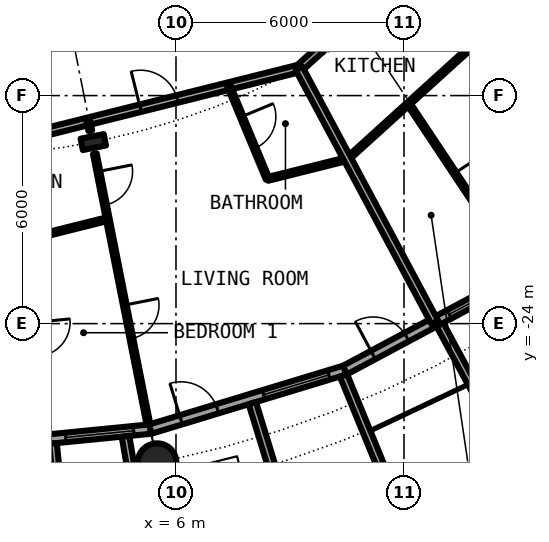
"""IFC4 building model, lengths in metres.
Left out: names, types, materials, properties, quantities, classifications, styles, units other than length and angle.
Written with IfcOpenShell. Run it as: python <this file> out.ifc"""

import sys

from ifc_helpers import new_model, si_unit, direction, frame, frame_2d, origin, origin_2d, place, context, subcontext, project, spatial, rectangle, hollow_circle, i_section, extrude, element, fill, save


model = new_model("IFC4")
c1 = context("Model", 3, precision=1e-05, world=origin(), true_north=direction((0.0, 1.0)))
c2 = subcontext(c1, "Body", "Model", "MODEL_VIEW")
j1 = project(units=[si_unit("LENGTHUNIT", "METRE"), si_unit("PLANEANGLEUNIT", "RADIAN")], contexts=[c1])
p1 = place(None, origin())
s1 = spatial("IfcSite", under=j1, at=p1, CompositionType="ELEMENT")
p2 = place(p1, origin())
s2 = spatial("IfcBuilding", under=s1, at=p2, CompositionType="ELEMENT")
p3 = place(p2, frame((0.0, 0.0, 31.95)))
s3 = spatial("IfcBuildingStorey", under=s2, at=p3, CompositionType="ELEMENT", Elevation=31.95)
p4 = place(p3, frame((5.501, -27.658, 0.0), z_axis=(0.0, 0.0, 1.0), x_axis=(1.0, 0.0, 0.0)))
e1 = element("IfcColumn", 1, at=p4, inside=s3, PredefinedType="COLUMN", context=c2, shape_type="SweptSolid", body=[
    extrude(hollow_circle(Radius=0.508, WallThickness=0.05, at=origin_2d()), origin(), (0.0, 0.0, 1.0), 3.05),
])
p5 = place(p3, frame((3.824, -19.223, 0.0), z_axis=(0.0, 0.0, 1.0), x_axis=(0.195090322016, -0.980785280403, 0.0)))
e2 = element("IfcColumn", 2, at=p5, inside=s3, PredefinedType="COLUMN", context=c2, shape_type="SweptSolid", body=[
    extrude(i_section(OverallWidth=0.305, OverallDepth=0.62, WebThickness=0.021, FlangeThickness=0.04, FilletRadius=0.027, at=origin_2d()), origin(), (0.0, 0.0, 1.0), 3.05),
])
p6 = place(p3, frame((0.0, -27.3, 0.0), z_axis=(0.0, 0.0, 1.0), x_axis=(0.995173996315, 0.098126026407, 0.0)))
e3 = element("IfcWall", 3, at=p6, inside=s3, PredefinedType="SOLIDWALL", context=c2, shape_type="SweptSolid", body=[
    extrude(rectangle(XDim=5.352, YDim=0.25, at=frame_2d((2.676, 0.0))), origin(), (0.0, 0.0, 1.0), 2.7),
])
p7 = place(p6, frame((0.841, 0.0, 0.0)))
e4 = element("IfcOpeningElement", 4, at=p7, cuts=e3, PredefinedType="OPENING", context=c2, shape_type="SweptSolid", body=[
    extrude(rectangle(XDim=1.0, YDim=2.2, at=frame_2d((0.5, 1.1))), frame((0.0, 0.135, 0.0), z_axis=(0.0, -1.0, 0.0), x_axis=(1.0, 0.0, 0.0)), (0.0, 0.0, 1.0), 0.27),
])
p8 = place(p6, frame((3.111, 0.0, 0.3)))
e5 = element("IfcOpeningElement", 5, at=p8, cuts=e3, PredefinedType="OPENING", context=c2, shape_type="SweptSolid", body=[
    extrude(rectangle(XDim=1.8, YDim=2.1, at=frame_2d((0.9, 1.05))), frame((0.0, 0.135, 0.0), z_axis=(0.0, -1.0, 0.0), x_axis=(1.0, 0.0, 0.0)), (0.0, 0.0, 1.0), 0.27),
])
p9 = place(p3, frame((2.764, -27.153, -0.03), z_axis=(0.0, 0.0, 1.0), x_axis=(0.101505487237, -0.994834979311, 0.0)))
e6 = element("IfcWall", 6, at=p9, inside=s3, PredefinedType="SOLIDWALL", context=c2, shape_type="SweptSolid", body=[
    extrude(rectangle(XDim=3.007, YDim=0.2, at=frame_2d((1.503, 0.0))), origin(), (0.0, 0.0, 1.0), 2.73),
])
p10 = place(p3, frame((4.671, -26.966, -0.03), z_axis=(0.0, 0.0, 1.0), x_axis=(0.170539878907, -0.985350774954, 0.0)))
e7 = element("IfcWall", 7, at=p10, inside=s3, PredefinedType="SOLIDWALL", context=c2, shape_type="SweptSolid", body=[
    extrude(rectangle(XDim=2.932, YDim=0.2, at=frame_2d((1.466, 0.0))), origin(), (0.0, 0.0, 1.0), 2.73),
])
p11 = place(p3, frame((5.326, -26.775, 0.0), z_axis=(0.0, 0.0, 1.0), x_axis=(0.956965678721, 0.290201119486, 0.0)))
e8 = element("IfcWall", 8, at=p11, inside=s3, PredefinedType="SOLIDWALL", context=c2, shape_type="SweptSolid", body=[
    extrude(rectangle(XDim=5.351, YDim=0.25, at=frame_2d((2.676, 0.0))), origin(), (0.0, 0.0, 1.0), 2.7),
])
p12 = place(p11, frame((0.841, 0.0, 0.0)))
e9 = element("IfcOpeningElement", 9, at=p12, cuts=e8, PredefinedType="OPENING", context=c2, shape_type="SweptSolid", body=[
    extrude(rectangle(XDim=1.0, YDim=2.2, at=frame_2d((0.5, 1.1))), frame((0.0, 0.135, 0.0), z_axis=(0.0, -1.0, 0.0), x_axis=(1.0, 0.0, 0.0)), (0.0, 0.0, 1.0), 0.27),
])
p13 = place(p11, frame((3.111, 0.0, 0.3)))
e10 = element("IfcOpeningElement", 10, at=p13, cuts=e8, PredefinedType="OPENING", context=c2, shape_type="SweptSolid", body=[
    extrude(rectangle(XDim=1.8, YDim=2.1, at=frame_2d((0.9, 1.05))), frame((0.0, 0.135, 0.0), z_axis=(0.0, -1.0, 0.0), x_axis=(1.0, 0.0, 0.0)), (0.0, 0.0, 1.0), 0.27),
])
p14 = place(p3, frame((8.009, -26.092, -0.03), z_axis=(0.0, 0.0, 1.0), x_axis=(0.293406695073, -0.955987715029, 0.0)))
e11 = element("IfcWall", 11, at=p14, inside=s3, PredefinedType="SOLIDWALL", context=c2, shape_type="SweptSolid", body=[
    extrude(rectangle(XDim=3.006, YDim=0.2, at=frame_2d((1.503, 0.0))), origin(), (0.0, 0.0, 1.0), 2.73),
])
p15 = place(p3, frame((10.409, -25.364, -0.03), z_axis=(0.0, 0.0, 1.0), x_axis=(0.379509886562, -0.925187681501, 0.0)))
e12 = element("IfcWall", 12, at=p15, inside=s3, PredefinedType="SOLIDWALL", context=c2, shape_type="SweptSolid", body=[
    extrude(rectangle(XDim=2.883, YDim=0.2, at=frame_2d((1.441, 0.0))), origin(), (0.0, 0.0, 1.0), 2.73),
])
p16 = place(p3, frame((10.447, -25.222, 0.0), z_axis=(0.0, 0.0, 1.0), x_axis=(0.881915646801, 0.471407246368, 0.0)))
e13 = element("IfcWall", 13, at=p16, inside=s3, PredefinedType="SOLIDWALL", context=c2, shape_type="SweptSolid", body=[
    extrude(rectangle(XDim=5.352, YDim=0.25, at=frame_2d((2.676, 0.0))), origin(), (0.0, 0.0, 1.0), 2.7),
])
p17 = place(p16, frame((0.841, 0.0, 0.0)))
e14 = element("IfcOpeningElement", 14, at=p17, cuts=e13, PredefinedType="OPENING", context=c2, shape_type="SweptSolid", body=[
    extrude(rectangle(XDim=1.0, YDim=2.2, at=frame_2d((0.5, 1.1))), frame((0.0, 0.135, 0.0), z_axis=(0.0, -1.0, 0.0), x_axis=(1.0, 0.0, 0.0)), (0.0, 0.0, 1.0), 0.27),
])
p18 = place(p16, frame((3.111, 0.0, 0.3)))
e15 = element("IfcOpeningElement", 15, at=p18, cuts=e13, PredefinedType="OPENING", context=c2, shape_type="SweptSolid", body=[
    extrude(rectangle(XDim=1.8, YDim=2.1, at=frame_2d((0.9, 1.05))), frame((0.0, 0.135, 0.0), z_axis=(0.0, -1.0, 0.0), x_axis=(1.0, 0.0, 0.0)), (0.0, 0.0, 1.0), 0.27),
])
p19 = place(p3, frame((12.945, -24.029, -0.03), z_axis=(0.0, 0.0, 1.0), x_axis=(0.474424310775, -0.88029629861, 0.0)))
e16 = element("IfcWall", 16, at=p19, inside=s3, PredefinedType="SOLIDWALL", context=c2, shape_type="SweptSolid", body=[
    extrude(rectangle(XDim=3.006, YDim=0.2, at=frame_2d((1.503, 0.0))), origin(), (0.0, 0.0, 1.0), 2.73),
])
p20 = place(p3, frame((-0.006, -22.301, 0.0), z_axis=(0.0, 0.0, 1.0), x_axis=(0.970106148391, 0.24268098577, 0.0)))
e17 = element("IfcWall", 17, at=p20, inside=s3, PredefinedType="PARTITIONING", context=c2, shape_type="SweptSolid", body=[
    extrude(rectangle(XDim=4.347, YDim=0.1, at=frame_2d((2.173, 0.0))), origin(), (0.0, 0.0, 1.0), 2.7),
])
p21 = place(p3, frame((8.414, -20.193, 0.0), z_axis=(0.0, 0.0, 1.0), x_axis=(0.970076188308, 0.242800718444, 0.0)))
e18 = element("IfcWall", 18, at=p21, inside=s3, PredefinedType="PARTITIONING", context=c2, shape_type="SweptSolid", body=[
    extrude(rectangle(XDim=2.167, YDim=0.1, at=frame_2d((1.083, 0.0))), origin(), (0.0, 0.0, 1.0), 2.7),
])
p22 = place(p3, frame((10.513, -19.668, 0.0), z_axis=(0.0, 0.0, 1.0), x_axis=(0.74092137325, 0.671591779775, 0.0)))
e19 = element("IfcWall", 19, at=p22, inside=s3, PredefinedType="PARTITIONING", context=c2, shape_type="SweptSolid", body=[
    extrude(rectangle(XDim=4.342, YDim=0.1, at=frame_2d((2.171, 0.0))), origin(), (0.0, 0.0, 1.0), 2.7),
])
p23 = place(p3, frame((-0.001, -19.601, 0.0), z_axis=(0.0, 0.0, 1.0), x_axis=(0.970014215304, 0.243048188859, 0.0)))
e20 = element("IfcWall", 20, at=p23, inside=s3, PredefinedType="PARTITIONING", context=c2, shape_type="SweptSolid", body=[
    extrude(rectangle(XDim=9.526, YDim=0.2, at=frame_2d((4.763, 0.0))), origin(), (0.0, 0.0, 1.0), 2.38),
])
p24 = place(p23, frame((5.221, 0.0, 0.0)))
e21 = element("IfcOpeningElement", 21, at=p24, cuts=e20, PredefinedType="OPENING", context=c2, shape_type="SweptSolid", body=[
    extrude(rectangle(XDim=1.0, YDim=2.3, at=frame_2d((0.5, 1.15))), frame((0.0, 0.11, 0.0), z_axis=(0.0, -1.0, 0.0), x_axis=(1.0, 0.0, 0.0)), (0.0, 0.0, 1.0), 0.22),
])
p25 = place(p3, frame((9.239, -17.286, 0.0), z_axis=(0.0, 0.0, 1.0), x_axis=(0.74089212117, 0.671624050186, 0.0)))
e22 = element("IfcWall", 22, at=p25, inside=s3, PredefinedType="PARTITIONING", context=c2, shape_type="SweptSolid", body=[
    extrude(rectangle(XDim=9.368, YDim=0.2, at=frame_2d((4.684, 0.0))), origin(), (0.0, 0.0, 1.0), 2.38),
])
p26 = place(p25, frame((5.215, 0.0, 0.0)))
e23 = element("IfcOpeningElement", 23, at=p26, cuts=e22, PredefinedType="OPENING", context=c2, shape_type="SweptSolid", body=[
    extrude(rectangle(XDim=1.0, YDim=2.3, at=frame_2d((0.5, 1.15))), frame((0.0, 0.11, 0.0), z_axis=(0.0, -1.0, 0.0), x_axis=(1.0, 0.0, 0.0)), (0.0, 0.0, 1.0), 0.22),
])
p27 = place(p3, frame((3.695, -18.674, 0.0), z_axis=(0.0, 0.0, 1.0), x_axis=(0.197040251839, -0.980395399395, 0.0)))
e24 = element("IfcWall", 24, at=p27, inside=s3, PredefinedType="PARTITIONING", context=c2, shape_type="SweptSolid", body=[
    extrude(rectangle(XDim=0.254, YDim=0.1, at=frame_2d((0.127, 0.0))), origin(), (0.0, 0.0, 1.0), 2.7),
])
p28 = place(p3, frame((3.865, -19.531, 0.0), z_axis=(0.0, 0.0, 1.0), x_axis=(0.194196464481, -0.980962656365, 0.0)))
e25 = element("IfcWall", 25, at=p28, inside=s3, PredefinedType="PARTITIONING", context=c2, shape_type="SweptSolid", body=[
    extrude(rectangle(XDim=7.265, YDim=0.1, at=frame_2d((3.633, 0.0))), origin(), (0.0, 0.0, 1.0), 2.7),
])
p29 = place(p28, frame((0.476, 0.0, 0.0)))
e26 = element("IfcOpeningElement", 26, at=p29, cuts=e25, PredefinedType="OPENING", context=c2, shape_type="SweptSolid", body=[
    extrude(rectangle(XDim=0.9, YDim=2.3, at=frame_2d((0.45, 1.15))), frame((0.0, 0.06, 0.0), z_axis=(0.0, -1.0, 0.0), x_axis=(1.0, 0.0, 0.0)), (0.0, 0.0, 1.0), 0.12),
])
p30 = place(p28, frame((4.058, 0.0, 0.0)))
e27 = element("IfcOpeningElement", 27, at=p30, cuts=e25, PredefinedType="OPENING", context=c2, shape_type="SweptSolid", body=[
    extrude(rectangle(XDim=0.9, YDim=2.3, at=frame_2d((0.45, 1.15))), frame((0.0, 0.06, 0.0), z_axis=(0.0, -1.0, 0.0), x_axis=(1.0, 0.0, 0.0)), (0.0, 0.0, 1.0), 0.12),
])
p31 = place(p3, frame((7.392, -17.749, 0.0), z_axis=(0.0, 0.0, 1.0), x_axis=(0.384438589316, -0.923150567917, 0.0)))
e28 = element("IfcWall", 28, at=p31, inside=s3, PredefinedType="PARTITIONING", context=c2, shape_type="SweptSolid", body=[
    extrude(rectangle(XDim=2.647, YDim=0.1, at=frame_2d((1.324, 0.0))), origin(), (0.0, 0.0, 1.0), 2.7),
])
p32 = place(p31, frame((0.874, 0.0, 0.0)))
e29 = element("IfcOpeningElement", 29, at=p32, cuts=e28, PredefinedType="OPENING", context=c2, shape_type="SweptSolid", body=[
    extrude(rectangle(XDim=0.9, YDim=2.3, at=frame_2d((0.45, 1.15))), frame((0.0, 0.06, 0.0), z_axis=(0.0, -1.0, 0.0), x_axis=(1.0, 0.0, 0.0)), (0.0, 0.0, 1.0), 0.12),
])
p33 = place(p3, frame((9.239, -17.286, 0.0), z_axis=(0.0, 0.0, 1.0), x_axis=(0.471439510802, -0.881898399848, 0.0)))
e30 = element("IfcWall", 30, at=p33, inside=s3, PredefinedType="PARTITIONING", context=c2, shape_type="SweptSolid", body=[
    extrude(rectangle(XDim=7.575, YDim=0.2, at=frame_2d((3.787, 0.0))), origin(), (0.0, 0.0, 1.0), 2.7),
])
p34 = place(p3, frame((12.062, -14.727, 0.0), z_axis=(0.0, 0.0, 1.0), x_axis=(0.633664062855, -0.773608334654, 0.0)))
e31 = element("IfcWall", 31, at=p34, inside=s3, PredefinedType="PARTITIONING", context=c2, shape_type="SweptSolid", body=[
    extrude(rectangle(XDim=8.138, YDim=0.1, at=frame_2d((4.069, 0.0))), origin(), (0.0, 0.0, 1.0), 2.7),
])
p35 = place(p34, frame((0.861, 0.0, 0.0)))
e32 = element("IfcOpeningElement", 32, at=p35, cuts=e31, PredefinedType="OPENING", context=c2, shape_type="SweptSolid", body=[
    extrude(rectangle(XDim=0.9, YDim=2.3, at=frame_2d((0.45, 1.15))), frame((0.0, 0.06, 0.0), z_axis=(0.0, -1.0, 0.0), x_axis=(1.0, 0.0, 0.0)), (0.0, 0.0, 1.0), 0.12),
])
p36 = place(p34, frame((4.931, 0.0, 0.0)))
e33 = element("IfcOpeningElement", 33, at=p36, cuts=e31, PredefinedType="OPENING", context=c2, shape_type="SweptSolid", body=[
    extrude(rectangle(XDim=0.9, YDim=2.3, at=frame_2d((0.45, 1.15))), frame((0.0, 0.06, 0.0), z_axis=(0.0, -1.0, 0.0), x_axis=(1.0, 0.0, 0.0)), (0.0, 0.0, 1.0), 0.12),
])
p37 = place(p3, frame((12.118, -18.211, 0.0), z_axis=(0.0, 0.0, 1.0), x_axis=(0.553913391217, -0.832574294, 0.0)))
e34 = element("IfcWall", 34, at=p37, inside=s3, PredefinedType="PARTITIONING", context=c2, shape_type="SweptSolid", body=[
    extrude(rectangle(XDim=5.301, YDim=0.1, at=frame_2d((2.65, 0.0))), origin(), (0.0, 0.0, 1.0), 2.7),
])
p38 = place(p37, frame((2.2, 0.0, 0.0)))
e35 = element("IfcOpeningElement", 35, at=p38, cuts=e34, PredefinedType="OPENING", context=c2, shape_type="SweptSolid", body=[
    extrude(rectangle(XDim=0.9, YDim=2.3, at=frame_2d((0.45, 1.15))), frame((0.0, 0.06, 0.0), z_axis=(0.0, -1.0, 0.0), x_axis=(1.0, 0.0, 0.0)), (0.0, 0.0, 1.0), 0.12),
])
p39 = place(p8, origin())
e36 = element("IfcWindow", 36, at=p39, inside=s3, PartitioningType="SINGLE_PANEL", PredefinedType="WINDOW", context=c2, shape_type="SweptSolid", body=[
    extrude(rectangle(XDim=1.8, YDim=2.1, at=frame_2d((0.9, 1.05))), frame((0.0, 0.03, 0.0), z_axis=(0.0, -1.0, 0.0), x_axis=(1.0, 0.0, 0.0)), (0.0, 0.0, 1.0), 0.06),
])
fill(e5, e36)
p40 = place(p12, origin())
e37 = element("IfcDoor", 37, at=p40, inside=s3, OperationType="SINGLE_SWING_LEFT", PredefinedType="DOOR", context=c2, shape_type="SweptSolid", body=[
    extrude(rectangle(XDim=1.0, YDim=2.2, at=frame_2d((0.5, 1.1))), frame((0.0, 0.025, 0.0), z_axis=(0.0, -1.0, 0.0), x_axis=(1.0, 0.0, 0.0)), (0.0, 0.0, 1.0), 0.05),
])
fill(e9, e37)
p41 = place(p13, origin())
e38 = element("IfcWindow", 38, at=p41, inside=s3, PartitioningType="SINGLE_PANEL", PredefinedType="WINDOW", context=c2, shape_type="SweptSolid", body=[
    extrude(rectangle(XDim=1.8, YDim=2.1, at=frame_2d((0.9, 1.05))), frame((0.0, 0.03, 0.0), z_axis=(0.0, -1.0, 0.0), x_axis=(1.0, 0.0, 0.0)), (0.0, 0.0, 1.0), 0.06),
])
fill(e10, e38)
p42 = place(p17, origin())
e39 = element("IfcDoor", 39, at=p42, inside=s3, OperationType="SINGLE_SWING_LEFT", PredefinedType="DOOR", context=c2, shape_type="SweptSolid", body=[
    extrude(rectangle(XDim=1.0, YDim=2.2, at=frame_2d((0.5, 1.1))), frame((0.0, 0.025, 0.0), z_axis=(0.0, -1.0, 0.0), x_axis=(1.0, 0.0, 0.0)), (0.0, 0.0, 1.0), 0.05),
])
fill(e14, e39)
p43 = place(p18, origin())
e40 = element("IfcWindow", 40, at=p43, inside=s3, PartitioningType="SINGLE_PANEL", PredefinedType="WINDOW", context=c2, shape_type="SweptSolid", body=[
    extrude(rectangle(XDim=1.8, YDim=2.1, at=frame_2d((0.9, 1.05))), frame((0.0, 0.03, 0.0), z_axis=(0.0, -1.0, 0.0), x_axis=(1.0, 0.0, 0.0)), (0.0, 0.0, 1.0), 0.06),
])
fill(e15, e40)
p44 = place(p24, origin())
e41 = element("IfcDoor", 41, at=p44, inside=s3, OperationType="SINGLE_SWING_RIGHT", PredefinedType="DOOR", context=c2, shape_type="SweptSolid", body=[
    extrude(rectangle(XDim=1.0, YDim=2.3, at=frame_2d((0.5, 1.15))), frame((0.0, 0.025, 0.0), z_axis=(0.0, -1.0, 0.0), x_axis=(1.0, 0.0, 0.0)), (0.0, 0.0, 1.0), 0.05),
])
fill(e21, e41)
p45 = place(p32, origin())
e42 = element("IfcDoor", 42, at=p45, inside=s3, OperationType="SINGLE_SWING_RIGHT", PredefinedType="DOOR", context=c2, shape_type="SweptSolid", body=[
    extrude(rectangle(XDim=0.9, YDim=2.3, at=frame_2d((0.45, 1.15))), frame((0.0, 0.025, 0.0), z_axis=(0.0, -1.0, 0.0), x_axis=(1.0, 0.0, 0.0)), (0.0, 0.0, 1.0), 0.05),
])
fill(e29, e42)
p46 = place(p29, origin())
e43 = element("IfcDoor", 43, at=p46, inside=s3, OperationType="SINGLE_SWING_LEFT", PredefinedType="DOOR", context=c2, shape_type="SweptSolid", body=[
    extrude(rectangle(XDim=0.9, YDim=2.3, at=frame_2d((0.45, 1.15))), frame((0.0, 0.025, 0.0), z_axis=(0.0, -1.0, 0.0), x_axis=(1.0, 0.0, 0.0)), (0.0, 0.0, 1.0), 0.05),
])
fill(e26, e43)
p47 = place(p30, origin())
e44 = element("IfcDoor", 44, at=p47, inside=s3, OperationType="SINGLE_SWING_RIGHT", PredefinedType="DOOR", context=c2, shape_type="SweptSolid", body=[
    extrude(rectangle(XDim=0.9, YDim=2.3, at=frame_2d((0.45, 1.15))), frame((0.0, 0.025, 0.0), z_axis=(0.0, -1.0, 0.0), x_axis=(1.0, 0.0, 0.0)), (0.0, 0.0, 1.0), 0.05),
])
fill(e27, e44)
p48 = place(p38, origin())
e45 = element("IfcDoor", 45, at=p48, inside=s3, OperationType="SINGLE_SWING_RIGHT", PredefinedType="DOOR", context=c2, shape_type="SweptSolid", body=[
    extrude(rectangle(XDim=0.9, YDim=2.3, at=frame_2d((0.45, 1.15))), frame((0.0, 0.025, 0.0), z_axis=(0.0, -1.0, 0.0), x_axis=(1.0, 0.0, 0.0)), (0.0, 0.0, 1.0), 0.05),
])
fill(e35, e45)
save(model, sys.argv[1])
